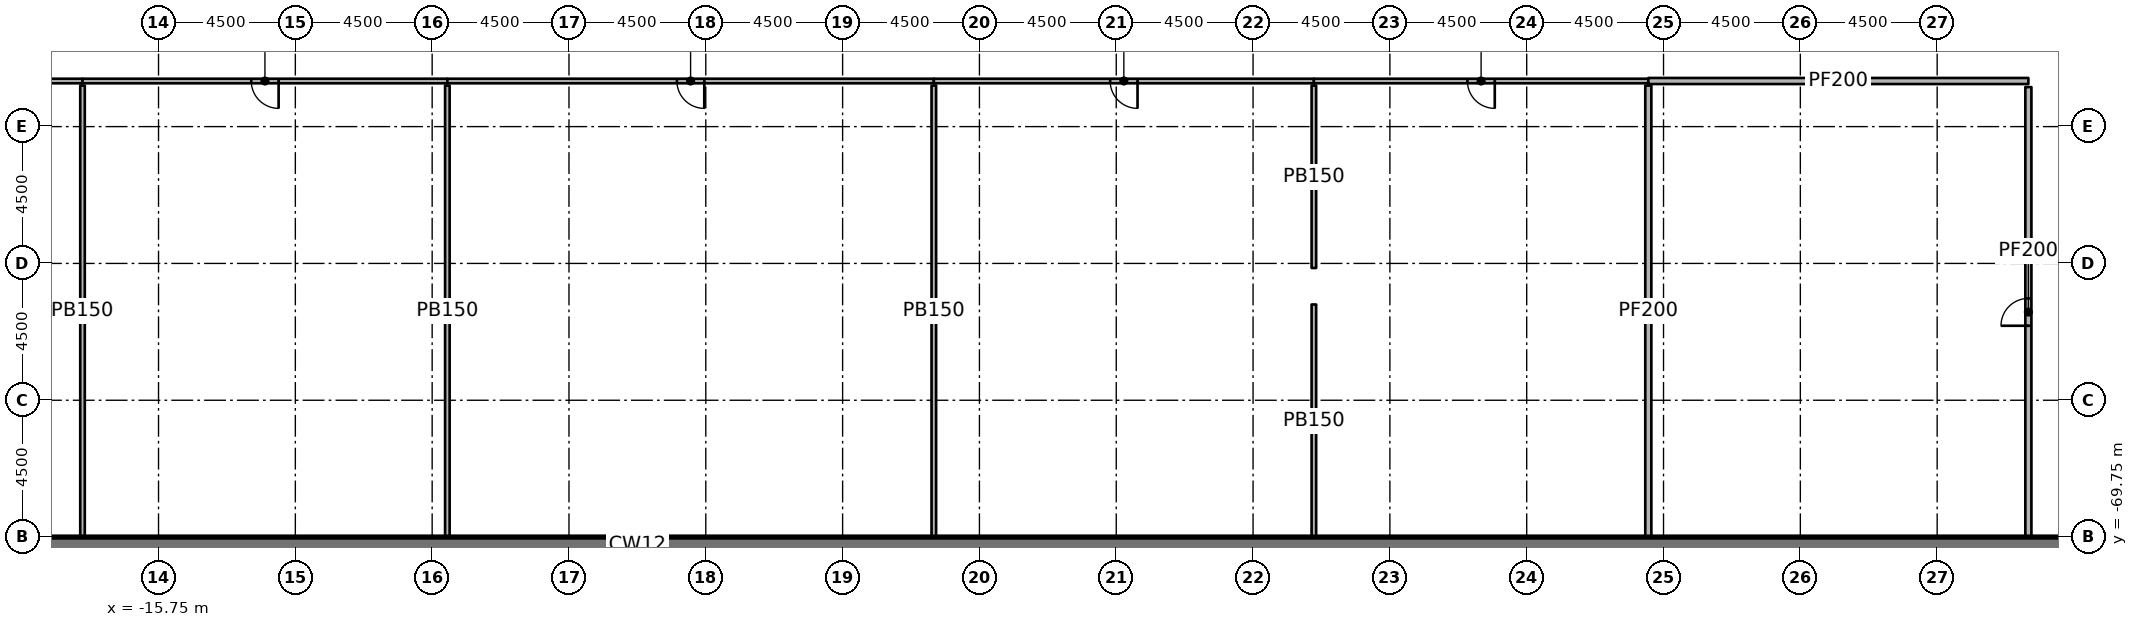
"""IFC4 building model, lengths in metres.
Left out: names, types, materials, properties, quantities, classifications, styles, units other than length and angle.
Written with IfcOpenShell. Run it as: python <this file> out.ifc"""

import sys

from ifc_helpers import new_model, si_unit, direction, frame, frame_2d, origin, origin_2d, place, context, subcontext, project, spatial, rectangle, extrude, element, fill, save


model = new_model("IFC4")
c1 = context("Model", 3, precision=1e-05, world=origin(), true_north=direction((0.0, 1.0)))
c2 = subcontext(c1, "Body", "Model", "MODEL_VIEW")
j1 = project(units=[si_unit("LENGTHUNIT", "METRE"), si_unit("PLANEANGLEUNIT", "RADIAN")], contexts=[c1])
p1 = place(None, origin())
s1 = spatial("IfcSite", under=j1, at=p1, CompositionType="ELEMENT")
p2 = place(p1, origin())
s2 = spatial("IfcBuilding", under=s1, at=p2, CompositionType="ELEMENT")
p3 = place(p2, frame((0.0, 0.0, -4.0)))
s3 = spatial("IfcBuildingStorey", under=s2, at=p3, CompositionType="ELEMENT", Elevation=-4.0)
for number, where, z_axis, x_axis in (
    (1, (-13.5, -61.5, 0.0), (0.0, 0.0, 1.0), (1.0, 0.0, 0.0)),
    (2, (-4.5, -61.5, 0.0), (0.0, 0.0, 1.0), (1.0, 0.0, 0.0)),
    (3, (4.5, -61.5, 0.0), (0.0, 0.0, 1.0), (1.0, 0.0, 0.0)),
    (4, (13.5, -61.5, 0.0), (0.0, 0.0, 1.0), (1.0, 0.0, 0.0)),
    (5, (22.5, -61.5, 0.0), (0.0, 0.0, 1.0), (1.0, 0.0, 0.0)),
    (6, (31.5, -61.5, 0.0), (0.0, 0.0, 1.0), (1.0, 0.0, 0.0)),
    (7, (40.5, -61.5, 0.0), (0.0, 0.0, 1.0), (1.0, 0.0, 0.0)),
):
    element("IfcColumn", number, at=place(p3, frame(where, z_axis=z_axis, x_axis=x_axis)), inside=s3, PredefinedType="COLUMN", context=c2, shape_type="SweptSolid", body=[
        extrude(rectangle(XDim=1.2, YDim=1.2, at=origin_2d()), origin(), (0.0, 0.0, 1.0), 3.1),
    ])
p4 = place(p3, frame((-61.25, -70.0, 0.0), z_axis=(0.0, 0.0, 1.0), x_axis=(1.0, 0.0, 0.0)))
e8 = element("IfcWall", 8, at=p4, inside=s3, PredefinedType="SOLIDWALL", context=c2, shape_type="SweptSolid", body=[
    extrude(rectangle(XDim=122.5, YDim=0.5, at=frame_2d((61.25, 0.0))), origin(), (0.0, 0.0, 1.0), 4.0),
])
p5 = place(p3, frame((-18.25, -54.75, 0.0), z_axis=(0.0, 0.0, 1.0), x_axis=(-1.0, 0.0, 0.0)))
e9 = element("IfcWall", 9, at=p5, inside=s3, PredefinedType="PARTITIONING", context=c2, shape_type="SweptSolid", body=[
    extrude(rectangle(XDim=14.0, YDim=0.15, at=frame_2d((7.0, 0.0))), origin(), (0.0, 0.0, 1.0), 3.1),
])
p6 = place(p5, frame((6.55, 0.0, 0.0)))
e10 = element("IfcOpeningElement", 10, at=p6, cuts=e9, PredefinedType="OPENING", context=c2, shape_type="SweptSolid", body=[
    extrude(rectangle(XDim=0.9, YDim=2.1, at=frame_2d((0.45, 1.05))), frame((0.0, 0.085, 0.0), z_axis=(0.0, -1.0, 0.0), x_axis=(1.0, 0.0, 0.0)), (0.0, 0.0, 1.0), 0.17),
])
p7 = place(p3, frame((-6.25, -54.75, 0.0), z_axis=(0.0, 0.0, 1.0), x_axis=(-1.0, 0.0, 0.0)))
e11 = element("IfcWall", 11, at=p7, inside=s3, PredefinedType="PARTITIONING", context=c2, shape_type="SweptSolid", body=[
    extrude(rectangle(XDim=12.0, YDim=0.15, at=frame_2d((6.0, 0.0))), origin(), (0.0, 0.0, 1.0), 3.1),
])
p8 = place(p7, frame((5.55, 0.0, 0.0)))
e12 = element("IfcOpeningElement", 12, at=p8, cuts=e11, PredefinedType="OPENING", context=c2, shape_type="SweptSolid", body=[
    extrude(rectangle(XDim=0.9, YDim=2.1, at=frame_2d((0.45, 1.05))), frame((0.0, 0.085, 0.0), z_axis=(0.0, -1.0, 0.0), x_axis=(1.0, 0.0, 0.0)), (0.0, 0.0, 1.0), 0.17),
])
p9 = place(p3, frame((9.75, -54.75, 0.0), z_axis=(0.0, 0.0, 1.0), x_axis=(-1.0, 0.0, 0.0)))
e13 = element("IfcWall", 13, at=p9, inside=s3, PredefinedType="PARTITIONING", context=c2, shape_type="SweptSolid", body=[
    extrude(rectangle(XDim=16.0, YDim=0.15, at=frame_2d((8.0, 0.0))), origin(), (0.0, 0.0, 1.0), 3.1),
])
p10 = place(p9, frame((7.55, 0.0, 0.0)))
e14 = element("IfcOpeningElement", 14, at=p10, cuts=e13, PredefinedType="OPENING", context=c2, shape_type="SweptSolid", body=[
    extrude(rectangle(XDim=0.9, YDim=2.1, at=frame_2d((0.45, 1.05))), frame((0.0, 0.085, 0.0), z_axis=(0.0, -1.0, 0.0), x_axis=(1.0, 0.0, 0.0)), (0.0, 0.0, 1.0), 0.17),
])
p11 = place(p3, frame((22.25, -54.75, 0.0), z_axis=(0.0, 0.0, 1.0), x_axis=(-1.0, 0.0, 0.0)))
e15 = element("IfcWall", 15, at=p11, inside=s3, PredefinedType="PARTITIONING", context=c2, shape_type="SweptSolid", body=[
    extrude(rectangle(XDim=12.5, YDim=0.15, at=frame_2d((6.25, 0.0))), origin(), (0.0, 0.0, 1.0), 3.1),
])
p12 = place(p11, frame((5.8, 0.0, 0.0)))
e16 = element("IfcOpeningElement", 16, at=p12, cuts=e15, PredefinedType="OPENING", context=c2, shape_type="SweptSolid", body=[
    extrude(rectangle(XDim=0.9, YDim=2.1, at=frame_2d((0.45, 1.05))), frame((0.0, 0.085, 0.0), z_axis=(0.0, -1.0, 0.0), x_axis=(1.0, 0.0, 0.0)), (0.0, 0.0, 1.0), 0.17),
])
p13 = place(p3, frame((33.25, -54.75, 0.0), z_axis=(0.0, 0.0, 1.0), x_axis=(-1.0, 0.0, 0.0)))
e17 = element("IfcWall", 17, at=p13, inside=s3, PredefinedType="PARTITIONING", context=c2, shape_type="SweptSolid", body=[
    extrude(rectangle(XDim=11.0, YDim=0.15, at=frame_2d((5.5, 0.0))), origin(), (0.0, 0.0, 1.0), 3.1),
])
p14 = place(p13, frame((5.05, 0.0, 0.0)))
e18 = element("IfcOpeningElement", 18, at=p14, cuts=e17, PredefinedType="OPENING", context=c2, shape_type="SweptSolid", body=[
    extrude(rectangle(XDim=0.9, YDim=2.1, at=frame_2d((0.45, 1.05))), frame((0.0, 0.085, 0.0), z_axis=(0.0, -1.0, 0.0), x_axis=(1.0, 0.0, 0.0)), (0.0, 0.0, 1.0), 0.17),
])
p15 = place(p3, frame((45.75, -54.75, 0.0), z_axis=(0.0, 0.0, 1.0), x_axis=(-1.0, 0.0, 0.0)))
e19 = element("IfcWall", 19, at=p15, inside=s3, PredefinedType="PARTITIONING", context=c2, shape_type="SweptSolid", body=[
    extrude(rectangle(XDim=12.5, YDim=0.2, at=frame_2d((6.25, 0.0))), origin(), (0.0, 0.0, 1.0), 3.1),
])
for number, where, z_axis, x_axis in (
    (20, (-18.25, -54.9, 0.0), (0.0, 0.0, 1.0), (0.0, -1.0, 0.0)),
    (21, (-6.25, -54.9, 0.0), (0.0, 0.0, 1.0), (0.0, -1.0, 0.0)),
    (22, (9.75, -54.9, 0.0), (0.0, 0.0, 1.0), (0.0, -1.0, 0.0)),
):
    element("IfcWall", number, at=place(p3, frame(where, z_axis=z_axis, x_axis=x_axis)), inside=s3, PredefinedType="PARTITIONING", context=c2, shape_type="SweptSolid", body=[
        extrude(rectangle(XDim=14.85, YDim=0.15, at=frame_2d((7.425, 0.0))), origin(), (0.0, 0.0, 1.0), 3.1),
    ])
p16 = place(p3, frame((22.25, -54.9, 0.0), z_axis=(0.0, 0.0, 1.0), x_axis=(0.0, -1.0, 0.0)))
e23 = element("IfcWall", 23, at=p16, inside=s3, PredefinedType="PARTITIONING", context=c2, shape_type="SweptSolid", body=[
    extrude(rectangle(XDim=6.0, YDim=0.15, at=frame_2d((3.0, 0.0))), origin(), (0.0, 0.0, 1.0), 3.1),
])
p17 = place(p3, frame((22.25, -62.1, 0.0), z_axis=(0.0, 0.0, 1.0), x_axis=(0.0, -1.0, 0.0)))
e24 = element("IfcWall", 24, at=p17, inside=s3, PredefinedType="PARTITIONING", context=c2, shape_type="SweptSolid", body=[
    extrude(rectangle(XDim=7.65, YDim=0.15, at=frame_2d((3.825, 0.0))), origin(), (0.0, 0.0, 1.0), 3.1),
])
p18 = place(p3, frame((33.25, -54.9, 0.0), z_axis=(0.0, 0.0, 1.0), x_axis=(0.0, -1.0, 0.0)))
e25 = element("IfcWall", 25, at=p18, inside=s3, PredefinedType="PARTITIONING", context=c2, shape_type="SweptSolid", body=[
    extrude(rectangle(XDim=14.85, YDim=0.2, at=frame_2d((7.425, 0.0))), origin(), (0.0, 0.0, 1.0), 3.1),
])
p19 = place(p3, frame((45.75, -69.75, 0.0), z_axis=(0.0, 0.0, 1.0), x_axis=(0.0, 1.0, 0.0)))
e26 = element("IfcWall", 26, at=p19, inside=s3, PredefinedType="PARTITIONING", context=c2, shape_type="SweptSolid", body=[
    extrude(rectangle(XDim=14.8, YDim=0.2, at=frame_2d((7.4, 0.0))), origin(), (0.0, 0.0, 1.0), 3.1),
])
p20 = place(p19, frame((6.95, 0.0, 0.0)))
e27 = element("IfcOpeningElement", 27, at=p20, cuts=e26, PredefinedType="OPENING", context=c2, shape_type="SweptSolid", body=[
    extrude(rectangle(XDim=0.9, YDim=2.1, at=frame_2d((0.45, 1.05))), frame((0.0, 0.11, 0.0), z_axis=(0.0, -1.0, 0.0), x_axis=(1.0, 0.0, 0.0)), (0.0, 0.0, 1.0), 0.22),
])
p21 = place(p8, origin())
e28 = element("IfcDoor", 28, at=p21, inside=s3, OperationType="SINGLE_SWING_LEFT", PredefinedType="DOOR", context=c2, shape_type="SweptSolid", body=[
    extrude(rectangle(XDim=0.9, YDim=2.1, at=frame_2d((0.45, 1.05))), frame((0.0, 0.025, 0.0), z_axis=(0.0, -1.0, 0.0), x_axis=(1.0, 0.0, 0.0)), (0.0, 0.0, 1.0), 0.05),
])
fill(e12, e28)
p22 = place(p10, origin())
e29 = element("IfcDoor", 29, at=p22, inside=s3, OperationType="SINGLE_SWING_LEFT", PredefinedType="DOOR", context=c2, shape_type="SweptSolid", body=[
    extrude(rectangle(XDim=0.9, YDim=2.1, at=frame_2d((0.45, 1.05))), frame((0.0, 0.025, 0.0), z_axis=(0.0, -1.0, 0.0), x_axis=(1.0, 0.0, 0.0)), (0.0, 0.0, 1.0), 0.05),
])
fill(e14, e29)
p23 = place(p12, origin())
e30 = element("IfcDoor", 30, at=p23, inside=s3, OperationType="SINGLE_SWING_LEFT", PredefinedType="DOOR", context=c2, shape_type="SweptSolid", body=[
    extrude(rectangle(XDim=0.9, YDim=2.1, at=frame_2d((0.45, 1.05))), frame((0.0, 0.025, 0.0), z_axis=(0.0, -1.0, 0.0), x_axis=(1.0, 0.0, 0.0)), (0.0, 0.0, 1.0), 0.05),
])
fill(e16, e30)
p24 = place(p14, origin())
e31 = element("IfcDoor", 31, at=p24, inside=s3, OperationType="SINGLE_SWING_LEFT", PredefinedType="DOOR", context=c2, shape_type="SweptSolid", body=[
    extrude(rectangle(XDim=0.9, YDim=2.1, at=frame_2d((0.45, 1.05))), frame((0.0, 0.025, 0.0), z_axis=(0.0, -1.0, 0.0), x_axis=(1.0, 0.0, 0.0)), (0.0, 0.0, 1.0), 0.05),
])
fill(e18, e31)
p25 = place(p20, origin())
e32 = element("IfcDoor", 32, at=p25, inside=s3, OperationType="SINGLE_SWING_LEFT", PredefinedType="DOOR", context=c2, shape_type="SweptSolid", body=[
    extrude(rectangle(XDim=0.9, YDim=2.1, at=frame_2d((0.45, 1.05))), frame((0.0, 0.025, 0.0), z_axis=(0.0, -1.0, 0.0), x_axis=(1.0, 0.0, 0.0)), (0.0, 0.0, 1.0), 0.05),
])
fill(e27, e32)
save(model, sys.argv[1])
